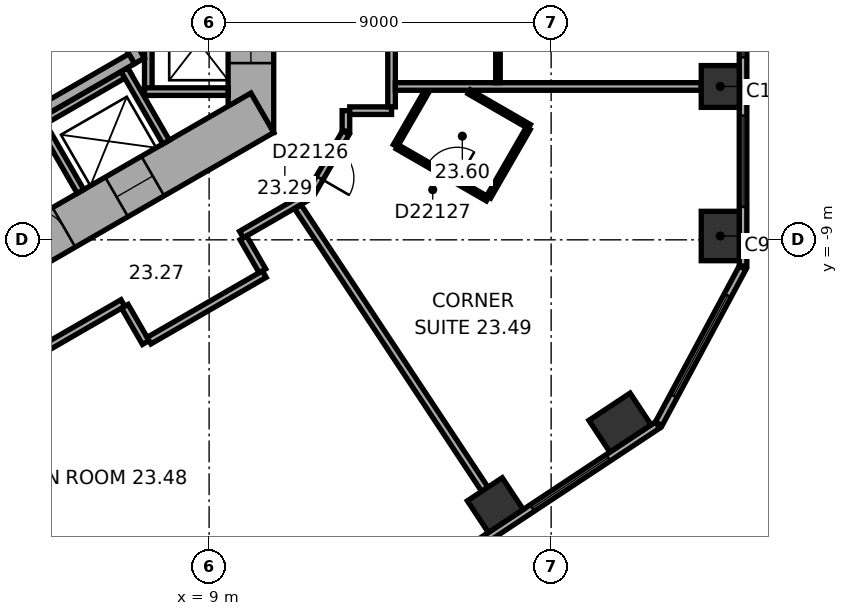
"""IFC4 building model, lengths in metres.
Left out: names, types, materials, properties, quantities, classifications, styles, units other than length and angle.
Written with IfcOpenShell. Run it as: python <this file> out.ifc"""

import sys

from ifc_helpers import new_model, si_unit, direction, frame, frame_2d, origin, origin_2d, place, context, subcontext, project, spatial, rectangle, extrude, element, fill, save


model = new_model("IFC4")
c1 = context("Model", 3, precision=1e-05, world=origin(), true_north=direction((0.0, 1.0)))
c2 = subcontext(c1, "Body", "Model", "MODEL_VIEW")
j1 = project(units=[si_unit("LENGTHUNIT", "METRE"), si_unit("PLANEANGLEUNIT", "RADIAN")], contexts=[c1])
p1 = place(None, origin())
s1 = spatial("IfcSite", under=j1, at=p1, CompositionType="ELEMENT")
p2 = place(p1, origin())
s2 = spatial("IfcBuilding", under=s1, at=p2, CompositionType="ELEMENT")
p3 = place(p2, frame((0.0, 0.0, 100.1)))
s3 = spatial("IfcBuildingStorey", under=s2, at=p3, CompositionType="ELEMENT", Elevation=100.1)
p4 = place(p3, frame((22.45, -8.899, 0.0), z_axis=(0.0, 0.0, 1.0), x_axis=(0.0, 1.0, 0.0)))
e1 = element("IfcColumn", 1, at=p4, inside=s3, PredefinedType="COLUMN", context=c2, shape_type="SweptSolid", body=[
    extrude(rectangle(XDim=1.3, YDim=1.0, at=origin_2d()), origin(), (0.0, 0.0, 1.0), 3.3),
])
for number, where, z_axis, x_axis in (
    (2, (22.45, -4.965, 0.0), (0.0, 0.0, 1.0), (0.0, 1.0, 0.0)),
    (3, (16.531, -15.981, 0.0), (0.0, 0.0, 1.0), (0.834, 0.552, 0.0)),
):
    element("IfcColumn", number, at=place(p3, frame(where, z_axis=z_axis, x_axis=x_axis)), inside=s3, PredefinedType="COLUMN", context=c2, shape_type="SweptSolid", body=[
        extrude(rectangle(XDim=1.1, YDim=1.0, at=origin_2d()), origin(), (0.0, 0.0, 1.0), 3.3),
    ])
p5 = place(p3, frame((19.812, -13.809, 0.0), z_axis=(0.0, 0.0, 1.0), x_axis=(0.833885822067, 0.551936985312, 0.0)))
e4 = element("IfcColumn", 4, at=p5, inside=s3, PredefinedType="COLUMN", context=c2, shape_type="SweptSolid", body=[
    extrude(rectangle(XDim=1.3, YDim=1.0, at=origin_2d()), origin(), (0.0, 0.0, 1.0), 3.3),
])
p6 = place(p3, frame((10.1, -6.177, 0.0), z_axis=(0.0, 0.0, 1.0), x_axis=(0.0, 1.0, 0.0)))
e5 = element("IfcWall", 5, at=p6, inside=s3, PredefinedType="SHEAR", context=c2, shape_type="SweptSolid", body=[
    extrude(rectangle(XDim=12.355, YDim=1.2, at=frame_2d((6.177, 0.0))), origin(), (0.0, 0.0, 1.0), 3.3),
])
p7 = place(p6, frame((6.378, 0.0, 0.0)))
e6 = element("IfcOpeningElement", 6, at=p7, cuts=e5, PredefinedType="OPENING", context=c2, shape_type="SweptSolid", body=[
    extrude(rectangle(XDim=1.5, YDim=2.1, at=frame_2d((0.75, 1.05))), frame((0.0, 0.61, 0.0), z_axis=(0.0, -1.0, 0.0), x_axis=(1.0, 0.0, 0.0)), (0.0, 0.0, 1.0), 1.22),
])
p8 = place(p6, frame((1.828, 0.0, 0.0)))
e7 = element("IfcOpeningElement", 7, at=p8, cuts=e5, PredefinedType="OPENING", context=c2, shape_type="SweptSolid", body=[
    extrude(rectangle(XDim=1.1, YDim=2.1, at=frame_2d((0.55, 1.05))), frame((0.0, 0.61, 0.0), z_axis=(0.0, -1.0, 0.0), x_axis=(1.0, 0.0, 0.0)), (0.0, 0.0, 1.0), 1.22),
])
p9 = place(p6, frame((4.427, 0.0, 0.0)))
e8 = element("IfcOpeningElement", 8, at=p9, cuts=e5, PredefinedType="OPENING", context=c2, shape_type="SweptSolid", body=[
    extrude(rectangle(XDim=1.1, YDim=2.1, at=frame_2d((0.55, 1.05))), frame((0.0, 0.61, 0.0), z_axis=(0.0, -1.0, 0.0), x_axis=(1.0, 0.0, 0.0)), (0.0, 0.0, 1.0), 1.22),
])
p10 = place(p3, frame((-0.3, -11.836, 0.0), z_axis=(0.0, 0.0, 1.0), x_axis=(0.866021384402, 0.500006961711, 0.0)))
e9 = element("IfcWall", 9, at=p10, inside=s3, PredefinedType="SHEAR", context=c2, shape_type="SweptSolid", body=[
    extrude(rectangle(XDim=12.355, YDim=1.2, at=frame_2d((6.178, 0.0))), origin(), (0.0, 0.0, 1.0), 3.3),
])
p11 = place(p10, frame((2.828, 0.0, 0.0)))
e10 = element("IfcOpeningElement", 10, at=p11, cuts=e9, PredefinedType="OPENING", context=c2, shape_type="SweptSolid", body=[
    extrude(rectangle(XDim=0.9, YDim=2.1, at=frame_2d((0.45, 1.05))), frame((0.0, 0.61, 0.0), z_axis=(0.0, -1.0, 0.0), x_axis=(1.0, 0.0, 0.0)), (0.0, 0.0, 1.0), 1.22),
])
p12 = place(p10, frame((5.428, 0.0, 0.0)))
e11 = element("IfcOpeningElement", 11, at=p12, cuts=e9, PredefinedType="OPENING", context=c2, shape_type="SweptSolid", body=[
    extrude(rectangle(XDim=0.9, YDim=2.1, at=frame_2d((0.45, 1.05))), frame((0.0, 0.61, 0.0), z_axis=(0.0, -1.0, 0.0), x_axis=(1.0, 0.0, 0.0)), (0.0, 0.0, 1.0), 1.22),
])
p13 = place(p10, frame((7.928, 0.0, 0.0)))
e12 = element("IfcOpeningElement", 12, at=p13, cuts=e9, PredefinedType="OPENING", context=c2, shape_type="SweptSolid", body=[
    extrude(rectangle(XDim=1.1, YDim=2.1, at=frame_2d((0.55, 1.05))), frame((0.0, 0.61, 0.0), z_axis=(0.0, -1.0, 0.0), x_axis=(1.0, 0.0, 0.0)), (0.0, 0.0, 1.0), 1.22),
])
p14 = place(p3, frame((23.05, -9.687, 0.0), z_axis=(0.0, 0.0, 1.0), x_axis=(0.0, 1.0, 0.0)))
e13 = element("IfcWall", 13, at=p14, inside=s3, PredefinedType="STANDARD", context=c2, shape_type="SweptSolid", body=[
    extrude(rectangle(XDim=21.246, YDim=0.2, at=frame_2d((10.623, 0.0))), origin(), (0.0, 0.0, 1.0), 3.3),
])
p15 = place(p14, frame((1.555, 0.0, 0.8)))
e14 = element("IfcOpeningElement", 14, at=p15, cuts=e13, PredefinedType="OPENING", context=c2, shape_type="SweptSolid", body=[
    extrude(rectangle(XDim=2.4, YDim=1.7, at=frame_2d((1.2, 0.85))), frame((0.0, 0.11, 0.0), z_axis=(0.0, -1.0, 0.0), x_axis=(1.0, 0.0, 0.0)), (0.0, 0.0, 1.0), 0.22),
])
p16 = place(p14, frame((5.489, 0.0, 0.8)))
e15 = element("IfcOpeningElement", 15, at=p16, cuts=e13, PredefinedType="OPENING", context=c2, shape_type="SweptSolid", body=[
    extrude(rectangle(XDim=2.4, YDim=1.7, at=frame_2d((1.2, 0.85))), frame((0.0, 0.11, 0.0), z_axis=(0.0, -1.0, 0.0), x_axis=(1.0, 0.0, 0.0)), (0.0, 0.0, 1.0), 0.22),
])
p17 = place(p14, frame((9.424, 0.0, 0.8)))
e16 = element("IfcOpeningElement", 16, at=p17, cuts=e13, PredefinedType="OPENING", context=c2, shape_type="SweptSolid", body=[
    extrude(rectangle(XDim=2.4, YDim=1.7, at=frame_2d((1.2, 0.85))), frame((0.0, 0.11, 0.0), z_axis=(0.0, -1.0, 0.0), x_axis=(1.0, 0.0, 0.0)), (0.0, 0.0, 1.0), 0.22),
])
p18 = place(p14, frame((13.358, 0.0, 0.8)))
e17 = element("IfcOpeningElement", 17, at=p18, cuts=e13, PredefinedType="OPENING", context=c2, shape_type="SweptSolid", body=[
    extrude(rectangle(XDim=2.4, YDim=1.7, at=frame_2d((1.2, 0.85))), frame((0.0, 0.11, 0.0), z_axis=(0.0, -1.0, 0.0), x_axis=(1.0, 0.0, 0.0)), (0.0, 0.0, 1.0), 0.22),
])
p19 = place(p14, frame((17.293, 0.0, 0.8)))
e18 = element("IfcOpeningElement", 18, at=p19, cuts=e13, PredefinedType="OPENING", context=c2, shape_type="SweptSolid", body=[
    extrude(rectangle(XDim=2.4, YDim=1.7, at=frame_2d((1.2, 0.85))), frame((0.0, 0.11, 0.0), z_axis=(0.0, -1.0, 0.0), x_axis=(1.0, 0.0, 0.0)), (0.0, 0.0, 1.0), 0.22),
])
p20 = place(p3, frame((3.083, -25.601, 0.0), z_axis=(0.0, 0.0, 1.0), x_axis=(0.833884295743, 0.551939291329, 0.0)))
e19 = element("IfcWall", 19, at=p20, inside=s3, PredefinedType="STANDARD", context=c2, shape_type="SweptSolid", body=[
    extrude(rectangle(XDim=21.246, YDim=0.2, at=frame_2d((10.623, 0.0))), origin(), (0.0, 0.0, 1.0), 3.3),
])
p21 = place(p20, frame((1.553, 0.0, 0.8)))
e20 = element("IfcOpeningElement", 20, at=p21, cuts=e19, PredefinedType="OPENING", context=c2, shape_type="SweptSolid", body=[
    extrude(rectangle(XDim=2.4, YDim=1.7, at=frame_2d((1.2, 0.85))), frame((0.0, 0.11, 0.0), z_axis=(0.0, -1.0, 0.0), x_axis=(1.0, 0.0, 0.0)), (0.0, 0.0, 1.0), 0.22),
])
p22 = place(p20, frame((5.488, 0.0, 0.8)))
e21 = element("IfcOpeningElement", 21, at=p22, cuts=e19, PredefinedType="OPENING", context=c2, shape_type="SweptSolid", body=[
    extrude(rectangle(XDim=2.4, YDim=1.7, at=frame_2d((1.2, 0.85))), frame((0.0, 0.11, 0.0), z_axis=(0.0, -1.0, 0.0), x_axis=(1.0, 0.0, 0.0)), (0.0, 0.0, 1.0), 0.22),
])
p23 = place(p20, frame((9.422, 0.0, 0.8)))
e22 = element("IfcOpeningElement", 22, at=p23, cuts=e19, PredefinedType="OPENING", context=c2, shape_type="SweptSolid", body=[
    extrude(rectangle(XDim=2.4, YDim=1.7, at=frame_2d((1.2, 0.85))), frame((0.0, 0.11, 0.0), z_axis=(0.0, -1.0, 0.0), x_axis=(1.0, 0.0, 0.0)), (0.0, 0.0, 1.0), 0.22),
])
p24 = place(p20, frame((13.357, 0.0, 0.8)))
e23 = element("IfcOpeningElement", 23, at=p24, cuts=e19, PredefinedType="OPENING", context=c2, shape_type="SweptSolid", body=[
    extrude(rectangle(XDim=2.4, YDim=1.7, at=frame_2d((1.2, 0.85))), frame((0.0, 0.11, 0.0), z_axis=(0.0, -1.0, 0.0), x_axis=(1.0, 0.0, 0.0)), (0.0, 0.0, 1.0), 0.22),
])
p25 = place(p20, frame((17.291, 0.0, 0.8)))
e24 = element("IfcOpeningElement", 24, at=p25, cuts=e19, PredefinedType="OPENING", context=c2, shape_type="SweptSolid", body=[
    extrude(rectangle(XDim=2.4, YDim=1.7, at=frame_2d((1.2, 0.85))), frame((0.0, 0.11, 0.0), z_axis=(0.0, -1.0, 0.0), x_axis=(1.0, 0.0, 0.0)), (0.0, 0.0, 1.0), 0.22),
])
p26 = place(p3, frame((20.833, -13.839, 0.0), z_axis=(0.0, 0.0, 1.0), x_axis=(0.473321668581, 0.880889662813, 0.0)))
e25 = element("IfcWall", 25, at=p26, inside=s3, PredefinedType="STANDARD", context=c2, shape_type="SweptSolid", body=[
    extrude(rectangle(XDim=4.66, YDim=0.2, at=frame_2d((2.33, 0.0))), origin(), (0.0, 0.0, 1.0), 3.3),
])
p27 = place(p26, frame((0.83, 0.0, 0.8)))
e26 = element("IfcOpeningElement", 26, at=p27, cuts=e25, PredefinedType="OPENING", context=c2, shape_type="SweptSolid", body=[
    extrude(rectangle(XDim=3.0, YDim=1.7, at=frame_2d((1.5, 0.85))), frame((0.0, 0.11, 0.0), z_axis=(0.0, -1.0, 0.0), x_axis=(1.0, 0.0, 0.0)), (0.0, 0.0, 1.0), 0.22),
])
p28 = place(p3, frame((7.4, -5.2, 0.0), z_axis=(0.0, 0.0, 1.0), x_axis=(0.0, 1.0, 0.0)))
e27 = element("IfcWall", 27, at=p28, inside=s3, PredefinedType="PARTITIONING", context=c2, shape_type="SweptSolid", body=[
    extrude(rectangle(XDim=5.4, YDim=0.2, at=frame_2d((2.7, 0.0))), origin(), (0.0, 0.0, 1.0), 3.05),
])
p29 = place(p3, frame((7.3, -5.1, 0.0), z_axis=(0.0, 0.0, 1.0), x_axis=(1.0, 0.0, 0.0)))
e28 = element("IfcWall", 28, at=p29, inside=s3, PredefinedType="PARTITIONING", context=c2, shape_type="SweptSolid", body=[
    extrude(rectangle(XDim=2.2, YDim=0.2, at=frame_2d((1.1, 0.0))), origin(), (0.0, 0.0, 1.0), 3.05),
])
p30 = place(p3, frame((-0.024, -8.559, 0.0), z_axis=(0.0, 0.0, 1.0), x_axis=(0.866026010844, 0.49999894854, 0.0)))
e29 = element("IfcWall", 29, at=p30, inside=s3, PredefinedType="PARTITIONING", context=c2, shape_type="SweptSolid", body=[
    extrude(rectangle(XDim=8.0, YDim=0.2, at=frame_2d((4.0, 0.0))), origin(), (0.0, 0.0, 1.0), 3.05),
])
for number, where, z_axis, x_axis in (
    (30, (4.516, -5.822, 0.0), (0.0, 0.0, 1.0), (0.5, -0.866, 0.0)),
    (31, (6.768, -4.522, 0.0), (0.0, 0.0, 1.0), (0.5, -0.866, 0.0)),
):
    element("IfcWall", number, at=place(p3, frame(where, z_axis=z_axis, x_axis=x_axis)), inside=s3, PredefinedType="PARTITIONING", context=c2, shape_type="SweptSolid", body=[
        extrude(rectangle(XDim=2.2, YDim=0.2, at=frame_2d((1.1, 0.0))), origin(), (0.0, 0.0, 1.0), 3.05),
    ])
p31 = place(p3, frame((4.816, -0.222, 0.0), z_axis=(0.0, 0.0, 1.0), x_axis=(0.499977259774, -0.866038532462, 0.0)))
e32 = element("IfcWall", 32, at=p31, inside=s3, PredefinedType="SHEAR", context=c2, shape_type="SweptSolid", body=[
    extrude(rectangle(XDim=4.7, YDim=0.3, at=frame_2d((2.35, 0.0))), origin(), (0.0, 0.0, 1.0), 3.05),
])
p32 = place(p3, frame((0.847, -7.767, 0.0), z_axis=(0.0, 0.0, 1.0), x_axis=(0.866027801685, 0.499995846692, 0.0)))
e33 = element("IfcWall", 33, at=p32, inside=s3, PredefinedType="SHEAR", context=c2, shape_type="SweptSolid", body=[
    extrude(rectangle(XDim=7.06, YDim=0.3, at=frame_2d((3.53, 0.0))), origin(), (0.0, 0.0, 1.0), 3.05),
])
p33 = place(p3, frame((1.033, -13.953, 0.0), z_axis=(0.0, 0.0, 1.0), x_axis=(0.866017531406, 0.500013635111, 0.0)))
e34 = element("IfcWall", 34, at=p33, inside=s3, PredefinedType="PARTITIONING", context=c2, shape_type="SweptSolid", body=[
    extrude(rectangle(XDim=6.58, YDim=0.2, at=frame_2d((3.29, 0.0))), origin(), (0.0, 0.0, 1.0), 3.05),
])
p34 = place(p33, frame((2.79, 0.0, 0.0)))
e35 = element("IfcOpeningElement", 35, at=p34, cuts=e34, PredefinedType="OPENING", context=c2, shape_type="SweptSolid", body=[
    extrude(rectangle(XDim=1.0, YDim=2.1, at=frame_2d((0.5, 1.05))), frame((0.0, 0.11, 0.0), z_axis=(0.0, -1.0, 0.0), x_axis=(1.0, 0.0, 0.0)), (0.0, 0.0, 1.0), 0.22),
])
p35 = place(p3, frame((6.412, -22.079, 0.0), z_axis=(0.0, 0.0, 1.0), x_axis=(-0.551919507115, 0.83389739037, 0.0)))
e36 = element("IfcWall", 36, at=p35, inside=s3, PredefinedType="PARTITIONING", context=c2, shape_type="SweptSolid", body=[
    extrude(rectangle(XDim=9.635, YDim=0.2, at=frame_2d((4.817, 0.0))), origin(), (0.0, 0.0, 1.0), 3.05),
])
p36 = place(p3, frame((6.782, -10.749, 0.0), z_axis=(0.0, 0.0, 1.0), x_axis=(0.500074377092, -0.865982457891, 0.0)))
e37 = element("IfcWall", 37, at=p36, inside=s3, PredefinedType="PARTITIONING", context=c2, shape_type="SweptSolid", body=[
    extrude(rectangle(XDim=1.101, YDim=0.2, at=frame_2d((0.55, 0.0))), origin(), (0.0, 0.0, 1.0), 3.05),
])
p37 = place(p3, frame((7.419, -11.653, 0.0), z_axis=(0.0, 0.0, 1.0), x_axis=(0.866038154057, 0.49997791523, 0.0)))
e38 = element("IfcWall", 38, at=p37, inside=s3, PredefinedType="PARTITIONING", context=c2, shape_type="SweptSolid", body=[
    extrude(rectangle(XDim=3.502, YDim=0.2, at=frame_2d((1.751, 0.0))), origin(), (0.0, 0.0, 1.0), 3.05),
])
p38 = place(p3, frame((9.852, -8.861, 0.0), z_axis=(0.0, 0.0, 1.0), x_axis=(0.866013291437, 0.500020978615, 0.0)))
e39 = element("IfcWall", 39, at=p38, inside=s3, PredefinedType="PARTITIONING", context=c2, shape_type="SweptSolid", body=[
    extrude(rectangle(XDim=2.077, YDim=0.2, at=frame_2d((1.038, 0.0))), origin(), (0.0, 0.0, 1.0), 3.05),
])
p39 = place(p3, frame((10.402, -9.815, 0.0), z_axis=(0.0, 0.0, 1.0), x_axis=(-0.499968756647, 0.866043441391, 0.0)))
e40 = element("IfcWall", 40, at=p39, inside=s3, PredefinedType="PARTITIONING", context=c2, shape_type="SweptSolid", body=[
    extrude(rectangle(XDim=1.001, YDim=0.2, at=frame_2d((0.5, 0.0))), origin(), (0.0, 0.0, 1.0), 3.05),
])
p40 = place(p3, frame((11.67, -7.788, 0.0), z_axis=(0.0, 0.0, 1.0), x_axis=(0.500063286585, 0.865988862174, 0.0)))
e41 = element("IfcWall", 41, at=p40, inside=s3, PredefinedType="PARTITIONING", context=c2, shape_type="SweptSolid", body=[
    extrude(rectangle(XDim=1.86, YDim=0.2, at=frame_2d((0.93, 0.0))), origin(), (0.0, 0.0, 1.0), 3.05),
])
p41 = place(p40, frame((0.48, 0.0, 0.0)))
e42 = element("IfcOpeningElement", 42, at=p41, cuts=e41, PredefinedType="OPENING", context=c2, shape_type="SweptSolid", body=[
    extrude(rectangle(XDim=0.9, YDim=2.1, at=frame_2d((0.45, 1.05))), frame((0.0, 0.11, 0.0), z_axis=(0.0, -1.0, 0.0), x_axis=(1.0, 0.0, 0.0)), (0.0, 0.0, 1.0), 0.22),
])
p42 = place(p3, frame((12.6, -6.138, 0.0), z_axis=(0.0, 0.0, 1.0), x_axis=(0.0, 1.0, 0.0)))
e43 = element("IfcWall", 43, at=p42, inside=s3, PredefinedType="PARTITIONING", context=c2, shape_type="SweptSolid", body=[
    extrude(rectangle(XDim=0.537, YDim=0.2, at=frame_2d((0.268, 0.0))), origin(), (0.0, 0.0, 1.0), 3.05),
])
p43 = place(p3, frame((12.7, -5.601, 0.0), z_axis=(0.0, 0.0, 1.0), x_axis=(1.0, 0.0, 0.0)))
e44 = element("IfcWall", 44, at=p43, inside=s3, PredefinedType="PARTITIONING", context=c2, shape_type="SweptSolid", body=[
    extrude(rectangle(XDim=1.101, YDim=0.2, at=frame_2d((0.551, 0.0))), origin(), (0.0, 0.0, 1.0), 3.05),
])
p44 = place(p3, frame((13.801, -5.501, 0.0), z_axis=(0.0, 0.0, 1.0), x_axis=(0.0, 1.0, 0.0)))
e45 = element("IfcWall", 45, at=p44, inside=s3, PredefinedType="PARTITIONING", context=c2, shape_type="SweptSolid", body=[
    extrude(rectangle(XDim=5.702, YDim=0.2, at=frame_2d((2.851, 0.0))), origin(), (0.0, 0.0, 1.0), 3.05),
])
p45 = place(p3, frame((13.901, -6.524, 0.0), z_axis=(0.0, 0.0, 1.0), x_axis=(0.499964162598, 0.86604609353, 0.0)))
e46 = element("IfcWall", 46, at=p45, inside=s3, PredefinedType="PARTITIONING", context=c2, shape_type="SweptSolid", body=[
    extrude(rectangle(XDim=1.661, YDim=0.12, at=frame_2d((0.831, 0.0))), origin(), (0.0, 0.0, 1.0), 3.05),
])
p46 = place(p3, frame((13.901, -4.965, 0.0), z_axis=(0.0, 0.0, 1.0), x_axis=(1.0, 0.0, 0.0)))
e47 = element("IfcWall", 47, at=p46, inside=s3, PredefinedType="PARTITIONING", context=c2, shape_type="SweptSolid", body=[
    extrude(rectangle(XDim=8.049, YDim=0.2, at=frame_2d((4.024, 0.0))), origin(), (0.0, 0.0, 1.0), 3.05),
])
p47 = place(p3, frame((15.841, -5.104, 0.0), z_axis=(0.0, 0.0, 1.0), x_axis=(0.866025591402, -0.499999675036, 0.0)))
e48 = element("IfcWall", 48, at=p47, inside=s3, PredefinedType="PARTITIONING", context=c2, shape_type="SweptSolid", body=[
    extrude(rectangle(XDim=1.83, YDim=0.12, at=frame_2d((0.915, 0.0))), origin(), (0.0, 0.0, 1.0), 3.05),
])
p48 = place(p3, frame((16.255, -15.564, 0.0), z_axis=(0.0, 0.0, 1.0), x_axis=(-0.55192208744, 0.833895682562, 0.0)))
e49 = element("IfcWall", 49, at=p48, inside=s3, PredefinedType="PARTITIONING", context=c2, shape_type="SweptSolid", body=[
    extrude(rectangle(XDim=8.913, YDim=0.2, at=frame_2d((4.457, 0.0))), origin(), (0.0, 0.0, 1.0), 2.6),
])
p49 = place(p3, frame((16.326, -7.925, 0.0), z_axis=(0.0, 0.0, 1.0), x_axis=(-0.865997131366, 0.500048966069, 0.0)))
e50 = element("IfcWall", 50, at=p49, inside=s3, PredefinedType="PARTITIONING", context=c2, shape_type="SweptSolid", body=[
    extrude(rectangle(XDim=2.74, YDim=0.12, at=frame_2d((1.37, 0.0))), origin(), (0.0, 0.0, 1.0), 3.05),
])
p50 = place(p49, frame((0.92, 0.0, 0.0)))
e51 = element("IfcOpeningElement", 51, at=p50, cuts=e50, PredefinedType="OPENING", context=c2, shape_type="SweptSolid", body=[
    extrude(rectangle(XDim=0.9, YDim=2.1, at=frame_2d((0.45, 1.05))), frame((0.0, 0.07, 0.0), z_axis=(0.0, -1.0, 0.0), x_axis=(1.0, 0.0, 0.0)), (0.0, 0.0, 1.0), 0.14),
])
p51 = place(p3, frame((16.601, -2.425, 0.0), z_axis=(0.0, 0.0, 1.0), x_axis=(0.0, -1.0, 0.0)))
e52 = element("IfcWall", 52, at=p51, inside=s3, PredefinedType="PARTITIONING", context=c2, shape_type="SweptSolid", body=[
    extrude(rectangle(XDim=2.44, YDim=0.12, at=frame_2d((1.22, 0.0))), origin(), (0.0, 0.0, 1.0), 3.05),
])
p52 = place(p3, frame((17.396, -6.071, 0.0), z_axis=(0.0, 0.0, 1.0), x_axis=(-0.500027264788, -0.866009661879, 0.0)))
e53 = element("IfcWall", 53, at=p52, inside=s3, PredefinedType="PARTITIONING", context=c2, shape_type="SweptSolid", body=[
    extrude(rectangle(XDim=2.08, YDim=0.12, at=frame_2d((1.04, 0.0))), origin(), (0.0, 0.0, 1.0), 3.05),
])
p53 = place(p15, origin())
e54 = element("IfcWindow", 54, at=p53, inside=s3, PartitioningType="SINGLE_PANEL", PredefinedType="WINDOW", context=c2, shape_type="SweptSolid", body=[
    extrude(rectangle(XDim=2.4, YDim=1.7, at=frame_2d((1.2, 0.85))), frame((0.0, 0.03, 0.0), z_axis=(0.0, -1.0, 0.0), x_axis=(1.0, 0.0, 0.0)), (0.0, 0.0, 1.0), 0.06),
])
fill(e14, e54)
p54 = place(p16, origin())
e55 = element("IfcWindow", 55, at=p54, inside=s3, PartitioningType="SINGLE_PANEL", PredefinedType="WINDOW", context=c2, shape_type="SweptSolid", body=[
    extrude(rectangle(XDim=2.4, YDim=1.7, at=frame_2d((1.2, 0.85))), frame((0.0, 0.03, 0.0), z_axis=(0.0, -1.0, 0.0), x_axis=(1.0, 0.0, 0.0)), (0.0, 0.0, 1.0), 0.06),
])
fill(e15, e55)
p55 = place(p25, origin())
e56 = element("IfcWindow", 56, at=p55, inside=s3, PartitioningType="SINGLE_PANEL", PredefinedType="WINDOW", context=c2, shape_type="SweptSolid", body=[
    extrude(rectangle(XDim=2.4, YDim=1.7, at=frame_2d((1.2, 0.85))), frame((0.0, 0.03, 0.0), z_axis=(0.0, -1.0, 0.0), x_axis=(1.0, 0.0, 0.0)), (0.0, 0.0, 1.0), 0.06),
])
fill(e24, e56)
p56 = place(p27, origin())
e57 = element("IfcWindow", 57, at=p56, inside=s3, PartitioningType="SINGLE_PANEL", PredefinedType="WINDOW", context=c2, shape_type="SweptSolid", body=[
    extrude(rectangle(XDim=3.0, YDim=1.7, at=frame_2d((1.5, 0.85))), frame((0.0, 0.03, 0.0), z_axis=(0.0, -1.0, 0.0), x_axis=(1.0, 0.0, 0.0)), (0.0, 0.0, 1.0), 0.06),
])
fill(e26, e57)
p57 = place(p12, origin())
e58 = element("IfcDoor", 58, at=p57, inside=s3, OperationType="SINGLE_SWING_LEFT", PredefinedType="DOOR", context=c2, shape_type="SweptSolid", body=[
    extrude(rectangle(XDim=0.9, YDim=2.1, at=frame_2d((0.45, 1.05))), frame((0.0, 0.025, 0.0), z_axis=(0.0, -1.0, 0.0), x_axis=(1.0, 0.0, 0.0)), (0.0, 0.0, 1.0), 0.05),
])
fill(e11, e58)
p58 = place(p8, origin())
e59 = element("IfcDoor", 59, at=p58, inside=s3, OperationType="DOUBLE_DOOR_SLIDING", PredefinedType="DOOR", context=c2, shape_type="SweptSolid", body=[
    extrude(rectangle(XDim=1.1, YDim=2.1, at=frame_2d((0.55, 1.05))), frame((0.0, 0.025, 0.0), z_axis=(0.0, -1.0, 0.0), x_axis=(1.0, 0.0, 0.0)), (0.0, 0.0, 1.0), 0.05),
])
fill(e7, e59)
p59 = place(p13, origin())
e60 = element("IfcDoor", 60, at=p59, inside=s3, OperationType="DOUBLE_DOOR_SLIDING", PredefinedType="DOOR", context=c2, shape_type="SweptSolid", body=[
    extrude(rectangle(XDim=1.1, YDim=2.1, at=frame_2d((0.55, 1.05))), frame((0.0, 0.025, 0.0), z_axis=(0.0, -1.0, 0.0), x_axis=(1.0, 0.0, 0.0)), (0.0, 0.0, 1.0), 0.05),
])
fill(e12, e60)
p60 = place(p41, origin())
e61 = element("IfcDoor", 61, at=p60, inside=s3, OperationType="SINGLE_SWING_LEFT", PredefinedType="DOOR", context=c2, shape_type="SweptSolid", body=[
    extrude(rectangle(XDim=0.9, YDim=2.1, at=frame_2d((0.45, 1.05))), frame((0.0, 0.025, 0.0), z_axis=(0.0, -1.0, 0.0), x_axis=(1.0, 0.0, 0.0)), (0.0, 0.0, 1.0), 0.05),
])
fill(e42, e61)
p61 = place(p50, origin())
e62 = element("IfcDoor", 62, at=p61, inside=s3, OperationType="SINGLE_SWING_LEFT", PredefinedType="DOOR", context=c2, shape_type="SweptSolid", body=[
    extrude(rectangle(XDim=0.9, YDim=2.1, at=frame_2d((0.45, 1.05))), frame((0.0, 0.025, 0.0), z_axis=(0.0, -1.0, 0.0), x_axis=(1.0, 0.0, 0.0)), (0.0, 0.0, 1.0), 0.05),
])
fill(e51, e62)
save(model, sys.argv[1])
